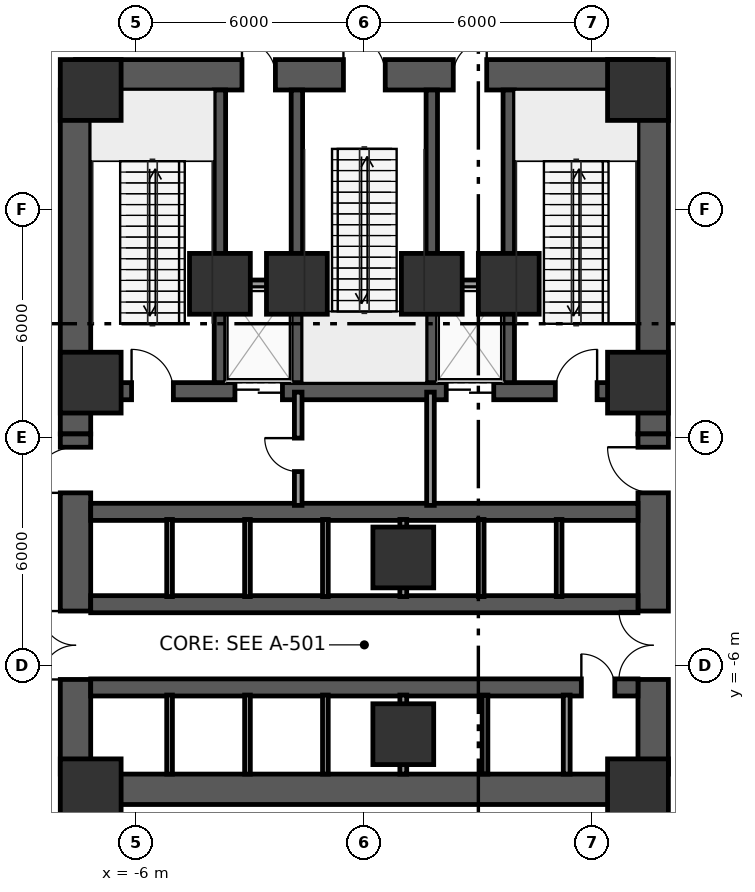
"""IFC4 building model, lengths in metres.
Left out: names, types, materials, properties, quantities, classifications, styles, units other than length and angle.
Written with IfcOpenShell. Run it as: python <this file> out.ifc"""

import sys

from ifc_helpers import new_model, si_unit, direction, frame, frame_2d, origin, origin_2d, place, context, subcontext, project, spatial, rectangle, extrude, element, fill, save


model = new_model("IFC4")
c1 = context("Model", 3, precision=1e-05, world=origin(), true_north=direction((0.0, 1.0)))
c2 = subcontext(c1, "Body", "Model", "MODEL_VIEW")
j1 = project(units=[si_unit("LENGTHUNIT", "METRE"), si_unit("PLANEANGLEUNIT", "RADIAN")], contexts=[c1])
p1 = place(None, origin())
s1 = spatial("IfcSite", under=j1, at=p1, CompositionType="ELEMENT")
p2 = place(p1, origin())
s2 = spatial("IfcBuilding", under=s1, at=p2, CompositionType="ELEMENT")
p3 = place(p2, frame((0.0, 0.0, -5.4)))
s3 = spatial("IfcBuildingStorey", under=s2, at=p3, CompositionType="ELEMENT", Elevation=-5.4)
p4 = place(p3, frame((-7.6, 9.55, 0.0), z_axis=(0.0, 0.0, 1.0), x_axis=(1.0, 0.0, 0.0)))
e1 = element("IfcWall", 1, at=p4, inside=s3, PredefinedType="SHEAR", context=c2, shape_type="SweptSolid", body=[
    extrude(rectangle(XDim=15.2, YDim=0.8, at=frame_2d((7.6, 0.0))), origin(), (0.0, 0.0, 1.0), 5.1),
])
p5 = place(p4, frame((7.05, 0.0, 0.0)))
e2 = element("IfcOpeningElement", 2, at=p5, cuts=e1, PredefinedType="OPENING", context=c2, shape_type="SweptSolid", body=[
    extrude(rectangle(XDim=1.1, YDim=2.15, at=frame_2d((0.55, 1.075))), frame((0.0, 0.41, 0.0), z_axis=(0.0, -1.0, 0.0), x_axis=(1.0, 0.0, 0.0)), (0.0, 0.0, 1.0), 0.82),
])
p6 = place(p4, frame((4.38, 0.0, 0.0)))
e3 = element("IfcOpeningElement", 3, at=p6, cuts=e1, PredefinedType="OPENING", context=c2, shape_type="SweptSolid", body=[
    extrude(rectangle(XDim=0.88, YDim=2.15, at=frame_2d((0.44, 1.075))), frame((0.0, 0.41, 0.0), z_axis=(0.0, -1.0, 0.0), x_axis=(1.0, 0.0, 0.0)), (0.0, 0.0, 1.0), 0.82),
])
p7 = place(p4, frame((9.94, 0.0, 0.0)))
e4 = element("IfcOpeningElement", 4, at=p7, cuts=e1, PredefinedType="OPENING", context=c2, shape_type="SweptSolid", body=[
    extrude(rectangle(XDim=0.88, YDim=2.15, at=frame_2d((0.44, 1.075))), frame((0.0, 0.41, 0.0), z_axis=(0.0, -1.0, 0.0), x_axis=(1.0, 0.0, 0.0)), (0.0, 0.0, 1.0), 0.82),
])
p8 = place(p3, frame((-7.2, 1.225, 0.0), z_axis=(0.0, 0.0, 1.0), x_axis=(1.0, 0.0, 0.0)))
e5 = element("IfcWall", 5, at=p8, inside=s3, PredefinedType="SHEAR", context=c2, shape_type="SweptSolid", body=[
    extrude(rectangle(XDim=14.4, YDim=0.45, at=frame_2d((7.2, 0.0))), origin(), (0.0, 0.0, 1.0), 5.1),
])
p9 = place(p8, frame((3.795, 0.0, 0.0)))
e6 = element("IfcOpeningElement", 6, at=p9, cuts=e5, PredefinedType="OPENING", context=c2, shape_type="SweptSolid", body=[
    extrude(rectangle(XDim=1.25, YDim=2.25, at=frame_2d((0.625, 1.125))), frame((0.0, 0.235, 0.0), z_axis=(0.0, -1.0, 0.0), x_axis=(1.0, 0.0, 0.0)), (0.0, 0.0, 1.0), 0.47),
])
p10 = place(p8, frame((9.355, 0.0, 0.0)))
e7 = element("IfcOpeningElement", 7, at=p10, cuts=e5, PredefinedType="OPENING", context=c2, shape_type="SweptSolid", body=[
    extrude(rectangle(XDim=1.25, YDim=2.25, at=frame_2d((0.625, 1.125))), frame((0.0, 0.235, 0.0), z_axis=(0.0, -1.0, 0.0), x_axis=(1.0, 0.0, 0.0)), (0.0, 0.0, 1.0), 0.47),
])
p11 = place(p8, frame((1.075, 0.0, 0.0)))
e8 = element("IfcOpeningElement", 8, at=p11, cuts=e5, PredefinedType="OPENING", context=c2, shape_type="SweptSolid", body=[
    extrude(rectangle(XDim=1.1, YDim=2.15, at=frame_2d((0.55, 1.075))), frame((0.0, 0.235, 0.0), z_axis=(0.0, -1.0, 0.0), x_axis=(1.0, 0.0, 0.0)), (0.0, 0.0, 1.0), 0.47),
])
p12 = place(p8, frame((12.225, 0.0, 0.0)))
e9 = element("IfcOpeningElement", 9, at=p12, cuts=e5, PredefinedType="OPENING", context=c2, shape_type="SweptSolid", body=[
    extrude(rectangle(XDim=1.1, YDim=2.15, at=frame_2d((0.55, 1.075))), frame((0.0, 0.235, 0.0), z_axis=(0.0, -1.0, 0.0), x_axis=(1.0, 0.0, 0.0)), (0.0, 0.0, 1.0), 0.47),
])
for number, where, z_axis, x_axis in (
    (10, (-3.8, 1.45, 0.0), (0.0, 0.0, 1.0), (0.0, 1.0, 0.0)),
    (11, (-1.775, 1.45, 0.0), (0.0, 0.0, 1.0), (0.0, 1.0, 0.0)),
    (12, (1.775, 1.45, 0.0), (0.0, 0.0, 1.0), (0.0, 1.0, 0.0)),
    (13, (3.8, 1.45, 0.0), (0.0, 0.0, 1.0), (0.0, 1.0, 0.0)),
):
    element("IfcWall", number, at=place(p3, frame(where, z_axis=z_axis, x_axis=x_axis)), inside=s3, PredefinedType="SHEAR", context=c2, shape_type="SweptSolid", body=[
        extrude(rectangle(XDim=7.7, YDim=0.3, at=frame_2d((3.85, 0.0))), origin(), (0.0, 0.0, 1.0), 5.1),
    ])
for number, where, z_axis, x_axis in (
    (14, (-7.6, 0.1, 0.0), (0.0, 0.0, 1.0), (0.0, 1.0, 0.0)),
    (15, (7.6, 0.1, 0.0), (0.0, 0.0, 1.0), (0.0, 1.0, 0.0)),
):
    element("IfcWall", number, at=place(p3, frame(where, z_axis=z_axis, x_axis=x_axis)), inside=s3, PredefinedType="SHEAR", context=c2, shape_type="SweptSolid", body=[
        extrude(rectangle(XDim=9.05, YDim=0.8, at=frame_2d((4.525, 0.0))), origin(), (0.0, 0.0, 1.0), 5.1),
    ])
p13 = place(p3, frame((-7.6, -8.85, 0.0), z_axis=(0.0, 0.0, 1.0), x_axis=(0.0, 1.0, 0.0)))
e16 = element("IfcWall", 16, at=p13, inside=s3, PredefinedType="SHEAR", context=c2, shape_type="SweptSolid", body=[
    extrude(rectangle(XDim=8.95, YDim=0.8, at=frame_2d((4.475, 0.0))), origin(), (0.0, 0.0, 1.0), 5.1),
])
p14 = place(p13, frame((2.49, 0.0, 0.0)))
e17 = element("IfcOpeningElement", 17, at=p14, cuts=e16, PredefinedType="OPENING", context=c2, shape_type="SweptSolid", body=[
    extrude(rectangle(XDim=1.8, YDim=2.2, at=frame_2d((0.9, 1.1))), frame((0.0, 0.41, 0.0), z_axis=(0.0, -1.0, 0.0), x_axis=(1.0, 0.0, 0.0)), (0.0, 0.0, 1.0), 0.82),
])
p15 = place(p13, frame((7.4, 0.0, 0.0)))
e18 = element("IfcOpeningElement", 18, at=p15, cuts=e16, PredefinedType="OPENING", context=c2, shape_type="SweptSolid", body=[
    extrude(rectangle(XDim=1.2, YDim=2.15, at=frame_2d((0.6, 1.075))), frame((0.0, 0.41, 0.0), z_axis=(0.0, -1.0, 0.0), x_axis=(1.0, 0.0, 0.0)), (0.0, 0.0, 1.0), 0.82),
])
p16 = place(p3, frame((7.6, -8.85, 0.0), z_axis=(0.0, 0.0, 1.0), x_axis=(0.0, 1.0, 0.0)))
e19 = element("IfcWall", 19, at=p16, inside=s3, PredefinedType="SHEAR", context=c2, shape_type="SweptSolid", body=[
    extrude(rectangle(XDim=8.95, YDim=0.8, at=frame_2d((4.475, 0.0))), origin(), (0.0, 0.0, 1.0), 5.1),
])
p17 = place(p16, frame((2.49, 0.0, 0.0)))
e20 = element("IfcOpeningElement", 20, at=p17, cuts=e19, PredefinedType="OPENING", context=c2, shape_type="SweptSolid", body=[
    extrude(rectangle(XDim=1.8, YDim=2.2, at=frame_2d((0.9, 1.1))), frame((0.0, 0.41, 0.0), z_axis=(0.0, -1.0, 0.0), x_axis=(1.0, 0.0, 0.0)), (0.0, 0.0, 1.0), 0.82),
])
p18 = place(p16, frame((7.4, 0.0, 0.0)))
e21 = element("IfcOpeningElement", 21, at=p18, cuts=e19, PredefinedType="OPENING", context=c2, shape_type="SweptSolid", body=[
    extrude(rectangle(XDim=1.2, YDim=2.15, at=frame_2d((0.6, 1.075))), frame((0.0, 0.41, 0.0), z_axis=(0.0, -1.0, 0.0), x_axis=(1.0, 0.0, 0.0)), (0.0, 0.0, 1.0), 0.82),
])
p19 = place(p3, frame((-7.6, -9.25, 0.0), z_axis=(0.0, 0.0, 1.0), x_axis=(1.0, 0.0, 0.0)))
e22 = element("IfcWall", 22, at=p19, inside=s3, PredefinedType="SHEAR", context=c2, shape_type="SweptSolid", body=[
    extrude(rectangle(XDim=15.2, YDim=0.8, at=frame_2d((7.6, 0.0))), origin(), (0.0, 0.0, 1.0), 5.1),
])
for number, where, z_axis, x_axis in (
    (23, (-7.2, -1.95, 0.0), (0.0, 0.0, 1.0), (1.0, 0.0, 0.0)),
    (24, (-7.2, -4.38, 0.0), (0.0, 0.0, 1.0), (1.0, 0.0, 0.0)),
):
    element("IfcWall", number, at=place(p3, frame(where, z_axis=z_axis, x_axis=x_axis)), inside=s3, PredefinedType="SHEAR", context=c2, shape_type="SweptSolid", body=[
        extrude(rectangle(XDim=14.4, YDim=0.45, at=frame_2d((7.2, 0.0))), origin(), (0.0, 0.0, 1.0), 5.1),
    ])
p20 = place(p3, frame((-7.2, -6.57, 0.0), z_axis=(0.0, 0.0, 1.0), x_axis=(1.0, 0.0, 0.0)))
e25 = element("IfcWall", 25, at=p20, inside=s3, PredefinedType="SHEAR", context=c2, shape_type="SweptSolid", body=[
    extrude(rectangle(XDim=14.4, YDim=0.45, at=frame_2d((7.2, 0.0))), origin(), (0.0, 0.0, 1.0), 5.1),
])
p21 = place(p20, frame((12.91, 0.0, 0.0)))
e26 = element("IfcOpeningElement", 26, at=p21, cuts=e25, PredefinedType="OPENING", context=c2, shape_type="SweptSolid", body=[
    extrude(rectangle(XDim=0.88, YDim=2.15, at=frame_2d((0.44, 1.075))), frame((0.0, 0.235, 0.0), z_axis=(0.0, -1.0, 0.0), x_axis=(1.0, 0.0, 0.0)), (0.0, 0.0, 1.0), 0.47),
])
for number, where, z_axis, x_axis in (
    (27, (-7.2, -9.25, 0.0), (0.0, 0.0, 1.0), (1.0, 0.0, 0.0)),
    (28, (7.2, -9.25, 0.0), (0.0, 0.0, 1.0), (1.0, 0.0, 0.0)),
    (29, (7.2, 1.45, 0.0), (0.0, 0.0, 1.0), (1.0, 0.0, 0.0)),
    (30, (7.2, 9.15, 0.0), (0.0, 0.0, 1.0), (1.0, 0.0, 0.0)),
    (31, (-7.2, 9.15, 0.0), (0.0, 0.0, 1.0), (1.0, 0.0, 0.0)),
    (32, (-7.2, 1.45, 0.0), (0.0, 0.0, 1.0), (1.0, 0.0, 0.0)),
    (33, (-3.8, 4.05, 0.0), (0.0, 0.0, 1.0), (1.0, 0.0, 0.0)),
    (34, (3.8, 4.05, 0.0), (0.0, 0.0, 1.0), (1.0, 0.0, 0.0)),
    (35, (-1.775, 4.05, 0.0), (0.0, 0.0, 1.0), (1.0, 0.0, 0.0)),
    (36, (1.775, 4.05, 0.0), (0.0, 0.0, 1.0), (1.0, 0.0, 0.0)),
    (37, (1.025, -3.15, 0.0), (0.0, 0.0, 1.0), (1.0, 0.0, 0.0)),
    (38, (1.025, -7.8, 0.0), (0.0, 0.0, 1.0), (1.0, 0.0, 0.0)),
):
    element("IfcColumn", number, at=place(p3, frame(where, z_axis=z_axis, x_axis=x_axis)), inside=s3, PredefinedType="COLUMN", context=c2, shape_type="SweptSolid", body=[
        extrude(rectangle(XDim=1.6, YDim=1.6, at=origin_2d()), origin(), (0.0, 0.0, 1.0), 5.4),
    ])
for number, where, z_axis, x_axis in (
    (39, (-3.65, 4.05, 0.0), (0.0, 0.0, 1.0), (1.0, 0.0, 0.0)),
    (40, (1.92, 4.05, 0.0), (0.0, 0.0, 1.0), (1.0, 0.0, 0.0)),
):
    element("IfcWall", number, at=place(p3, frame(where, z_axis=z_axis, x_axis=x_axis)), inside=s3, PredefinedType="PARTITIONING", context=c2, shape_type="SweptSolid", body=[
        extrude(rectangle(XDim=1.73, YDim=0.2, at=frame_2d((0.865, 0.0))), origin(), (0.0, 0.0, 1.0), 5.1),
    ])
for number, where, z_axis, x_axis in (
    (41, (-5.125, -4.18, 0.0), (0.0, 0.0, 1.0), (0.0, 1.0, 0.0)),
    (42, (-3.075, -4.18, 0.0), (0.0, 0.0, 1.0), (0.0, 1.0, 0.0)),
    (43, (-1.025, -4.18, 0.0), (0.0, 0.0, 1.0), (0.0, 1.0, 0.0)),
):
    element("IfcWall", number, at=place(p3, frame(where, z_axis=z_axis, x_axis=x_axis)), inside=s3, PredefinedType="PARTITIONING", context=c2, shape_type="SweptSolid", body=[
        extrude(rectangle(XDim=2.03, YDim=0.15, at=frame_2d((1.015, 0.0))), origin(), (0.0, 0.0, 1.0), 5.1),
    ])
p22 = place(p3, frame((1.025, -4.18, 0.0), z_axis=(0.0, 0.0, 1.0), x_axis=(0.0, 1.0, 0.0)))
e44 = element("IfcWall", 44, at=p22, inside=s3, PredefinedType="PARTITIONING", context=c2, shape_type="SweptSolid", body=[
    extrude(rectangle(XDim=2.03, YDim=0.18, at=frame_2d((1.015, 0.0))), origin(), (0.0, 0.0, 1.0), 4.148),
])
for number, where, z_axis, x_axis in (
    (45, (3.075, -4.18, 0.0), (0.0, 0.0, 1.0), (0.0, 1.0, 0.0)),
    (46, (5.125, -4.18, 0.0), (0.0, 0.0, 1.0), (0.0, 1.0, 0.0)),
):
    element("IfcWall", number, at=place(p3, frame(where, z_axis=z_axis, x_axis=x_axis)), inside=s3, PredefinedType="PARTITIONING", context=c2, shape_type="SweptSolid", body=[
        extrude(rectangle(XDim=2.03, YDim=0.15, at=frame_2d((1.015, 0.0))), origin(), (0.0, 0.0, 1.0), 5.1),
    ])
for number, where, z_axis, x_axis in (
    (47, (-5.125, -8.85, 0.0), (0.0, 0.0, 1.0), (0.0, 1.0, 0.0)),
    (48, (-3.075, -8.85, 0.0), (0.0, 0.0, 1.0), (0.0, 1.0, 0.0)),
    (49, (-1.025, -8.85, 0.0), (0.0, 0.0, 1.0), (0.0, 1.0, 0.0)),
):
    element("IfcWall", number, at=place(p3, frame(where, z_axis=z_axis, x_axis=x_axis)), inside=s3, PredefinedType="PARTITIONING", context=c2, shape_type="SweptSolid", body=[
        extrude(rectangle(XDim=2.08, YDim=0.15, at=frame_2d((1.04, 0.0))), origin(), (0.0, 0.0, 1.0), 5.1),
    ])
p23 = place(p3, frame((1.025, -8.85, 0.0), z_axis=(0.0, 0.0, 1.0), x_axis=(0.0, 1.0, 0.0)))
e50 = element("IfcWall", 50, at=p23, inside=s3, PredefinedType="PARTITIONING", context=c2, shape_type="SweptSolid", body=[
    extrude(rectangle(XDim=2.08, YDim=0.18, at=frame_2d((1.04, 0.0))), origin(), (0.0, 0.0, 1.0), 4.148),
])
p24 = place(p3, frame((3.175, -8.85, 0.0), z_axis=(0.0, 0.0, 1.0), x_axis=(0.0, 1.0, 0.0)))
e51 = element("IfcWall", 51, at=p24, inside=s3, PredefinedType="PARTITIONING", context=c2, shape_type="SweptSolid", body=[
    extrude(rectangle(XDim=2.08, YDim=0.15, at=frame_2d((1.04, 0.0))), origin(), (0.0, 0.0, 1.0), 5.1),
])
p25 = place(p3, frame((5.325, -8.85, 0.0), z_axis=(0.0, 0.0, 1.0), x_axis=(0.0, 1.0, 0.0)))
e52 = element("IfcWall", 52, at=p25, inside=s3, PredefinedType="PARTITIONING", context=c2, shape_type="SweptSolid", body=[
    extrude(rectangle(XDim=2.08, YDim=0.18, at=frame_2d((1.04, 0.0))), origin(), (0.0, 0.0, 1.0), 5.1),
])
p26 = place(p3, frame((-1.74, -1.78, 0.0), z_axis=(0.0, 0.0, 1.0), x_axis=(0.0, 1.0, 0.0)))
e53 = element("IfcWall", 53, at=p26, inside=s3, PredefinedType="PARTITIONING", context=c2, shape_type="SweptSolid", body=[
    extrude(rectangle(XDim=2.98, YDim=0.2, at=frame_2d((1.49, 0.0))), origin(), (0.0, 0.0, 1.0), 5.1),
])
p27 = place(p26, frame((0.89, 0.0, 0.0)))
e54 = element("IfcOpeningElement", 54, at=p27, cuts=e53, PredefinedType="OPENING", context=c2, shape_type="SweptSolid", body=[
    extrude(rectangle(XDim=0.88, YDim=2.15, at=frame_2d((0.44, 1.075))), frame((0.0, 0.11, 0.0), z_axis=(0.0, -1.0, 0.0), x_axis=(1.0, 0.0, 0.0)), (0.0, 0.0, 1.0), 0.22),
])
p28 = place(p3, frame((1.74, -1.78, 0.0), z_axis=(0.0, 0.0, 1.0), x_axis=(0.0, 1.0, 0.0)))
e55 = element("IfcWall", 55, at=p28, inside=s3, PredefinedType="PARTITIONING", context=c2, shape_type="SweptSolid", body=[
    extrude(rectangle(XDim=2.98, YDim=0.2, at=frame_2d((1.49, 0.0))), origin(), (0.0, 0.0, 1.0), 5.1),
])
p29 = place(p9, origin())
e56 = element("IfcDoor", 56, at=p29, inside=s3, OperationType="DOUBLE_DOOR_SLIDING", PredefinedType="DOOR", context=c2, shape_type="SweptSolid", body=[
    extrude(rectangle(XDim=1.25, YDim=2.25, at=frame_2d((0.625, 1.125))), frame((0.0, 0.025, 0.0), z_axis=(0.0, -1.0, 0.0), x_axis=(1.0, 0.0, 0.0)), (0.0, 0.0, 1.0), 0.05),
])
fill(e6, e56)
p30 = place(p10, origin())
e57 = element("IfcDoor", 57, at=p30, inside=s3, OperationType="DOUBLE_DOOR_SLIDING", PredefinedType="DOOR", context=c2, shape_type="SweptSolid", body=[
    extrude(rectangle(XDim=1.25, YDim=2.25, at=frame_2d((0.625, 1.125))), frame((0.0, 0.025, 0.0), z_axis=(0.0, -1.0, 0.0), x_axis=(1.0, 0.0, 0.0)), (0.0, 0.0, 1.0), 0.05),
])
fill(e7, e57)
p31 = place(p11, origin())
e58 = element("IfcDoor", 58, at=p31, inside=s3, OperationType="SINGLE_SWING_LEFT", PredefinedType="DOOR", context=c2, shape_type="SweptSolid", body=[
    extrude(rectangle(XDim=1.1, YDim=2.15, at=frame_2d((0.55, 1.075))), frame((0.0, 0.025, 0.0), z_axis=(0.0, -1.0, 0.0), x_axis=(1.0, 0.0, 0.0)), (0.0, 0.0, 1.0), 0.05),
])
fill(e8, e58)
p32 = place(p12, origin())
e59 = element("IfcDoor", 59, at=p32, inside=s3, OperationType="SINGLE_SWING_RIGHT", PredefinedType="DOOR", context=c2, shape_type="SweptSolid", body=[
    extrude(rectangle(XDim=1.1, YDim=2.15, at=frame_2d((0.55, 1.075))), frame((0.0, 0.025, 0.0), z_axis=(0.0, -1.0, 0.0), x_axis=(1.0, 0.0, 0.0)), (0.0, 0.0, 1.0), 0.05),
])
fill(e9, e59)
p33 = place(p5, origin())
e60 = element("IfcDoor", 60, at=p33, inside=s3, OperationType="SINGLE_SWING_LEFT", PredefinedType="DOOR", context=c2, shape_type="SweptSolid", body=[
    extrude(rectangle(XDim=1.1, YDim=2.15, at=frame_2d((0.55, 1.075))), frame((0.0, 0.025, 0.0), z_axis=(0.0, -1.0, 0.0), x_axis=(1.0, 0.0, 0.0)), (0.0, 0.0, 1.0), 0.05),
])
fill(e2, e60)
p34 = place(p6, origin())
e61 = element("IfcDoor", 61, at=p34, inside=s3, OperationType="SINGLE_SWING_LEFT", PredefinedType="DOOR", context=c2, shape_type="SweptSolid", body=[
    extrude(rectangle(XDim=0.88, YDim=2.15, at=frame_2d((0.44, 1.075))), frame((0.0, 0.025, 0.0), z_axis=(0.0, -1.0, 0.0), x_axis=(1.0, 0.0, 0.0)), (0.0, 0.0, 1.0), 0.05),
])
fill(e3, e61)
p35 = place(p7, origin())
e62 = element("IfcDoor", 62, at=p35, inside=s3, OperationType="SINGLE_SWING_RIGHT", PredefinedType="DOOR", context=c2, shape_type="SweptSolid", body=[
    extrude(rectangle(XDim=0.88, YDim=2.15, at=frame_2d((0.44, 1.075))), frame((0.0, 0.025, 0.0), z_axis=(0.0, -1.0, 0.0), x_axis=(1.0, 0.0, 0.0)), (0.0, 0.0, 1.0), 0.05),
])
fill(e4, e62)
p36 = place(p14, origin())
e63 = element("IfcDoor", 63, at=p36, inside=s3, OperationType="DOUBLE_DOOR_SINGLE_SWING", PredefinedType="DOOR", context=c2, shape_type="SweptSolid", body=[
    extrude(rectangle(XDim=1.8, YDim=2.2, at=frame_2d((0.9, 1.1))), frame((0.0, 0.025, 0.0), z_axis=(0.0, -1.0, 0.0), x_axis=(1.0, 0.0, 0.0)), (0.0, 0.0, 1.0), 0.05),
])
fill(e17, e63)
p37 = place(p15, origin())
e64 = element("IfcDoor", 64, at=p37, inside=s3, OperationType="SINGLE_SWING_LEFT", PredefinedType="DOOR", context=c2, shape_type="SweptSolid", body=[
    extrude(rectangle(XDim=1.2, YDim=2.15, at=frame_2d((0.6, 1.075))), frame((0.0, 0.025, 0.0), z_axis=(0.0, -1.0, 0.0), x_axis=(1.0, 0.0, 0.0)), (0.0, 0.0, 1.0), 0.05),
])
fill(e18, e64)
p38 = place(p17, origin())
e65 = element("IfcDoor", 65, at=p38, inside=s3, OperationType="DOUBLE_DOOR_SINGLE_SWING", PredefinedType="DOOR", context=c2, shape_type="SweptSolid", body=[
    extrude(rectangle(XDim=1.8, YDim=2.2, at=frame_2d((0.9, 1.1))), frame((0.0, 0.025, 0.0), z_axis=(0.0, -1.0, 0.0), x_axis=(1.0, 0.0, 0.0)), (0.0, 0.0, 1.0), 0.05),
])
fill(e20, e65)
p39 = place(p18, origin())
e66 = element("IfcDoor", 66, at=p39, inside=s3, OperationType="SINGLE_SWING_RIGHT", PredefinedType="DOOR", context=c2, shape_type="SweptSolid", body=[
    extrude(rectangle(XDim=1.2, YDim=2.15, at=frame_2d((0.6, 1.075))), frame((0.0, 0.025, 0.0), z_axis=(0.0, -1.0, 0.0), x_axis=(1.0, 0.0, 0.0)), (0.0, 0.0, 1.0), 0.05),
])
fill(e21, e66)
p40 = place(p21, origin())
e67 = element("IfcDoor", 67, at=p40, inside=s3, OperationType="SINGLE_SWING_LEFT", PredefinedType="DOOR", context=c2, shape_type="SweptSolid", body=[
    extrude(rectangle(XDim=0.88, YDim=2.15, at=frame_2d((0.44, 1.075))), frame((0.0, 0.025, 0.0), z_axis=(0.0, -1.0, 0.0), x_axis=(1.0, 0.0, 0.0)), (0.0, 0.0, 1.0), 0.05),
])
fill(e26, e67)
p41 = place(p27, origin())
e68 = element("IfcDoor", 68, at=p41, inside=s3, OperationType="SINGLE_SWING_RIGHT", PredefinedType="DOOR", context=c2, shape_type="SweptSolid", body=[
    extrude(rectangle(XDim=0.88, YDim=2.15, at=frame_2d((0.44, 1.075))), frame((0.0, 0.025, 0.0), z_axis=(0.0, -1.0, 0.0), x_axis=(1.0, 0.0, 0.0)), (0.0, 0.0, 1.0), 0.05),
])
fill(e54, e68)
save(model, sys.argv[1])
